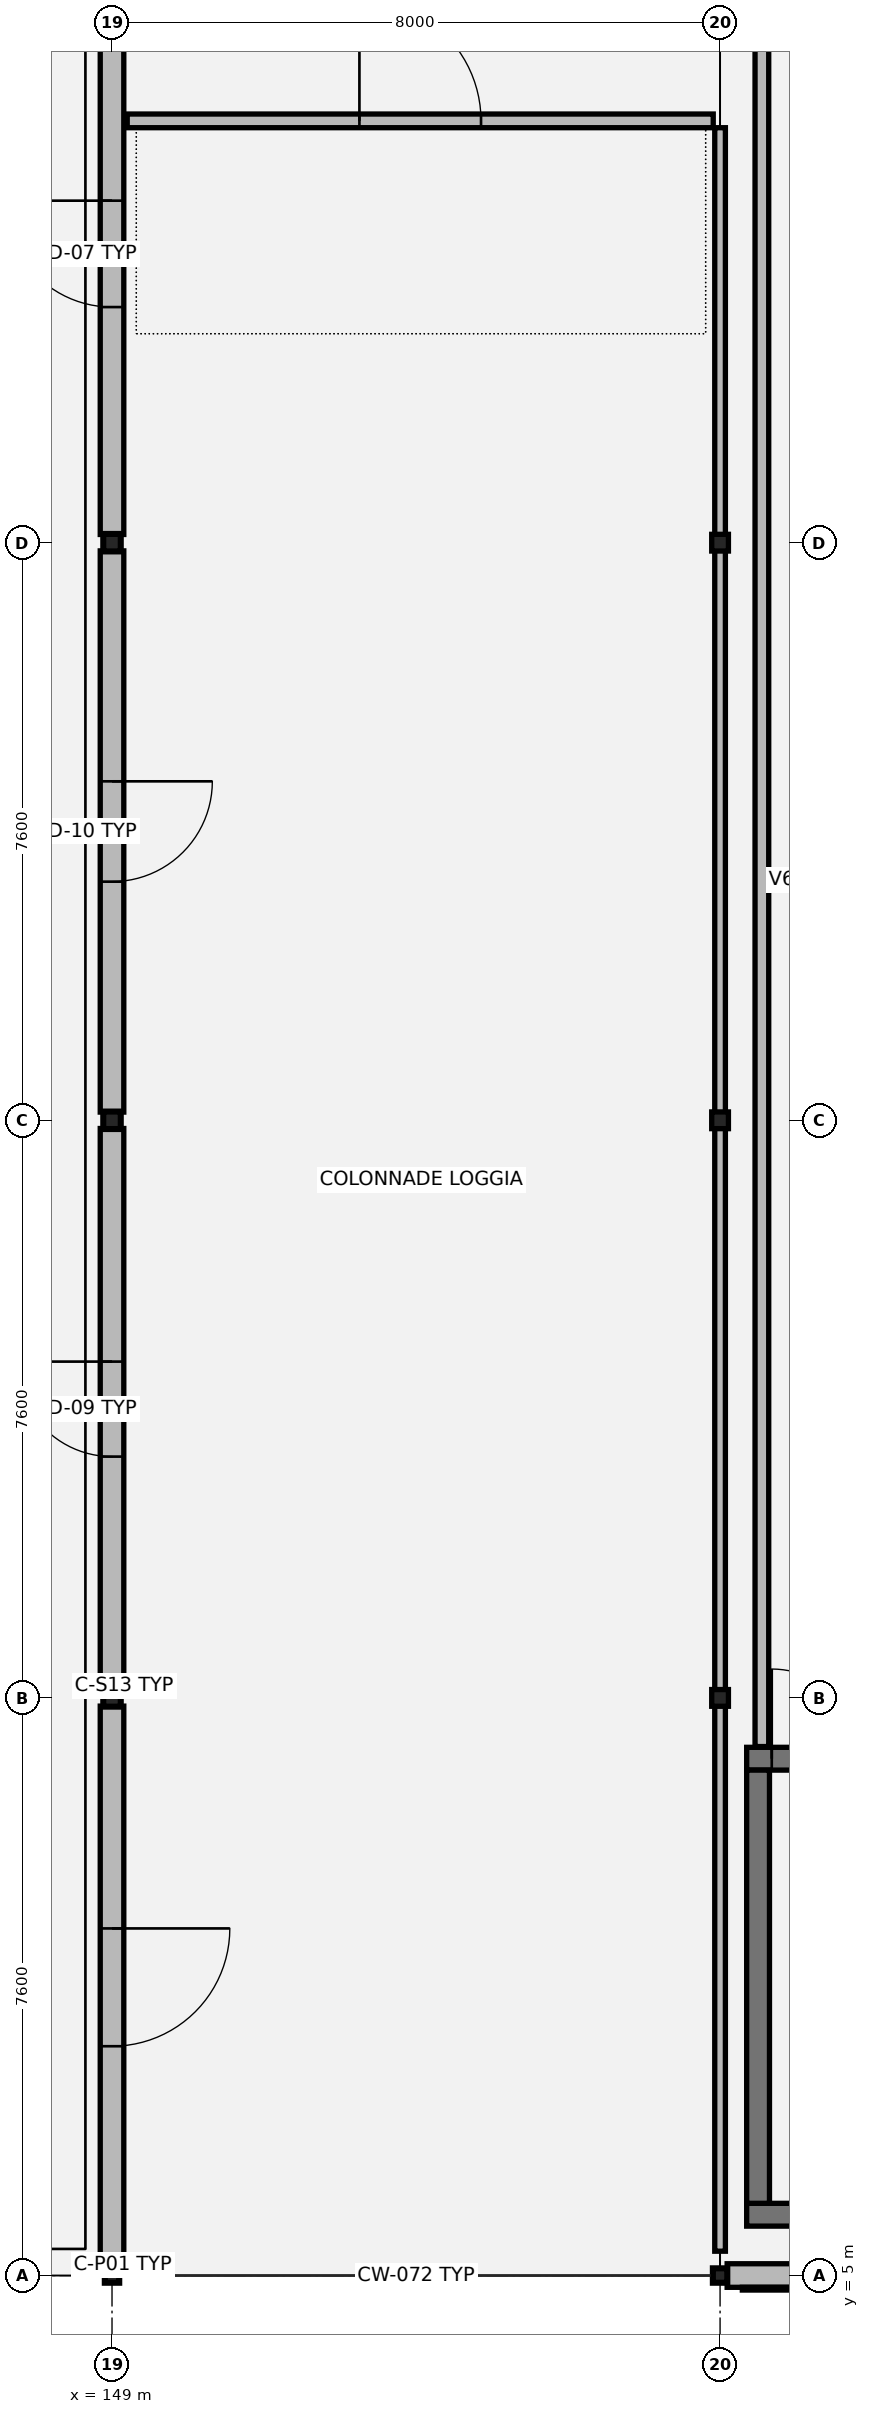
"""IFC4 building model, lengths in metres.
Left out: names, types, materials, properties, quantities, classifications, styles, units other than length and angle.
Written with IfcOpenShell. Run it as: python <this file> out.ifc"""

import sys

from ifc_helpers import new_model, si_unit, direction, frame, frame_2d, origin, origin_2d, place, context, subcontext, project, spatial, rectangle, hollow_rectangle, i_section, extrude, element, fill, save


model = new_model("IFC4")
c1 = context("Model", 3, precision=1e-05, world=origin(), true_north=direction((0.0, 1.0)))
c2 = subcontext(c1, "Body", "Model", "MODEL_VIEW")
j1 = project(units=[si_unit("LENGTHUNIT", "METRE"), si_unit("PLANEANGLEUNIT", "RADIAN")], contexts=[c1])
p1 = place(None, origin())
s1 = spatial("IfcSite", under=j1, at=p1, CompositionType="ELEMENT")
p2 = place(p1, origin())
s2 = spatial("IfcBuilding", under=s1, at=p2, CompositionType="ELEMENT")
p3 = place(p2, frame((0.0, 0.0, 17.34)))
s3 = spatial("IfcBuildingStorey", under=s2, at=p3, CompositionType="ELEMENT", Elevation=17.34)
p4 = place(p3, frame((149.0, 5.0, 0.0), z_axis=(0.0, 0.0, 1.0), x_axis=(1.0, 0.0, 0.0)))
e1 = element("IfcColumn", 1, at=p4, inside=s3, PredefinedType="COLUMN", context=c2, shape_type="SweptSolid", body=[
    extrude(hollow_rectangle(XDim=0.18, YDim=0.18, WallThickness=0.01, at=origin_2d()), origin(), (0.0, 0.0, 1.0), 3.89),
])
for number, where, z_axis, x_axis in (
    (2, (149.0, 12.6, 0.0), (0.0, 0.0, 1.0), (1.0, 0.0, 0.0)),
    (3, (149.0, 20.2, 0.0), (0.0, 0.0, 1.0), (1.0, 0.0, 0.0)),
    (4, (149.0, 27.8, 0.0), (0.0, 0.0, 1.0), (1.0, 0.0, 0.0)),
):
    element("IfcColumn", number, at=place(p3, frame(where, z_axis=z_axis, x_axis=x_axis)), inside=s3, PredefinedType="COLUMN", context=c2, shape_type="SweptSolid", body=[
        extrude(i_section(OverallWidth=0.22, OverallDepth=0.22, WebThickness=0.01, FlangeThickness=0.016, at=origin_2d()), origin(), (0.0, 0.0, 1.0), 3.89),
    ])
p5 = place(p3, frame((157.0, 5.0, 0.0), z_axis=(0.0, 0.0, 1.0), x_axis=(1.0, 0.0, 0.0)))
e5 = element("IfcColumn", 5, at=p5, inside=s3, PredefinedType="COLUMN", context=c2, shape_type="SweptSolid", body=[
    extrude(hollow_rectangle(XDim=0.18, YDim=0.18, WallThickness=0.01, at=origin_2d()), origin(), (0.0, 0.0, 1.0), 3.89),
])
for number, where, z_axis, x_axis in (
    (6, (157.0, 12.6, 0.0), (0.0, 0.0, 1.0), (1.0, 0.0, 0.0)),
    (7, (157.0, 20.2, 0.0), (0.0, 0.0, 1.0), (1.0, 0.0, 0.0)),
    (8, (157.0, 27.8, 0.0), (0.0, 0.0, 1.0), (1.0, 0.0, 0.0)),
):
    element("IfcColumn", number, at=place(p3, frame(where, z_axis=z_axis, x_axis=x_axis)), inside=s3, PredefinedType="COLUMN", context=c2, shape_type="SweptSolid", body=[
        extrude(i_section(OverallWidth=0.22, OverallDepth=0.22, WebThickness=0.01, FlangeThickness=0.016, at=origin_2d()), origin(), (0.0, 0.0, 1.0), 3.89),
    ])
p6 = place(p3, frame((157.093, 5.0, 0.0), z_axis=(0.0, 0.0, 1.0), x_axis=(1.0, 0.0, 0.0)))
e9 = element("IfcWall", 9, at=p6, inside=s3, PredefinedType="SOLIDWALL", context=c2, shape_type="SweptSolid", body=[
    extrude(rectangle(XDim=7.814, YDim=0.31, at=frame_2d((3.907, 0.0))), origin(), (0.0, 0.0, 1.0), 3.48),
])
p7 = place(p6, frame((1.882, 0.0, 0.8)))
e10 = element("IfcOpeningElement", 10, at=p7, cuts=e9, PredefinedType="OPENING", context=c2, shape_type="SweptSolid", body=[
    extrude(rectangle(XDim=1.7, YDim=2.2, at=frame_2d((0.85, 1.1))), frame((0.0, 0.165, 0.0), z_axis=(0.0, -1.0, 0.0), x_axis=(1.0, 0.0, 0.0)), (0.0, 0.0, 1.0), 0.33),
])
p8 = place(p6, frame((4.232, 0.0, 0.8)))
e11 = element("IfcOpeningElement", 11, at=p8, cuts=e9, PredefinedType="OPENING", context=c2, shape_type="SweptSolid", body=[
    extrude(rectangle(XDim=1.7, YDim=2.2, at=frame_2d((0.85, 1.1))), frame((0.0, 0.165, 0.0), z_axis=(0.0, -1.0, 0.0), x_axis=(1.0, 0.0, 0.0)), (0.0, 0.0, 1.0), 0.33),
])
p9 = place(p3, frame((149.0, 35.292, 0.0), z_axis=(0.0, 0.0, 1.0), x_axis=(0.0, -1.0, 0.0)))
e12 = element("IfcWall", 12, at=p9, inside=s3, PredefinedType="SOLIDWALL", context=c2, shape_type="SweptSolid", body=[
    extrude(rectangle(XDim=7.384, YDim=0.31, at=frame_2d((3.692, 0.0))), origin(), (0.0, 0.0, 1.0), 3.27),
])
p10 = place(p9, frame((2.992, 0.0, 0.0)))
e13 = element("IfcOpeningElement", 13, at=p10, cuts=e12, PredefinedType="OPENING", context=c2, shape_type="SweptSolid", body=[
    extrude(rectangle(XDim=1.4, YDim=2.25, at=frame_2d((0.7, 1.125))), frame((0.0, 0.165, 0.0), z_axis=(0.0, -1.0, 0.0), x_axis=(1.0, 0.0, 0.0)), (0.0, 0.0, 1.0), 0.33),
])
p11 = place(p3, frame((149.0, 27.692, 0.0), z_axis=(0.0, 0.0, 1.0), x_axis=(0.0, -1.0, 0.0)))
e14 = element("IfcWall", 14, at=p11, inside=s3, PredefinedType="SOLIDWALL", context=c2, shape_type="SweptSolid", body=[
    extrude(rectangle(XDim=7.384, YDim=0.31, at=frame_2d((3.692, 0.0))), origin(), (0.0, 0.0, 1.0), 3.27),
])
p12 = place(p11, frame((3.032, 0.0, 0.0)))
e15 = element("IfcOpeningElement", 15, at=p12, cuts=e14, PredefinedType="OPENING", context=c2, shape_type="SweptSolid", body=[
    extrude(rectangle(XDim=1.32, YDim=2.22, at=frame_2d((0.66, 1.11))), frame((0.0, 0.165, 0.0), z_axis=(0.0, -1.0, 0.0), x_axis=(1.0, 0.0, 0.0)), (0.0, 0.0, 1.0), 0.33),
])
p13 = place(p3, frame((149.0, 20.092, 0.0), z_axis=(0.0, 0.0, 1.0), x_axis=(0.0, -1.0, 0.0)))
e16 = element("IfcWall", 16, at=p13, inside=s3, PredefinedType="SOLIDWALL", context=c2, shape_type="SweptSolid", body=[
    extrude(rectangle(XDim=7.384, YDim=0.31, at=frame_2d((3.692, 0.0))), origin(), (0.0, 0.0, 1.0), 3.27),
])
p14 = place(p13, frame((3.067, 0.0, 0.0)))
e17 = element("IfcOpeningElement", 17, at=p14, cuts=e16, PredefinedType="OPENING", context=c2, shape_type="SweptSolid", body=[
    extrude(rectangle(XDim=1.25, YDim=2.2, at=frame_2d((0.625, 1.1))), frame((0.0, 0.165, 0.0), z_axis=(0.0, -1.0, 0.0), x_axis=(1.0, 0.0, 0.0)), (0.0, 0.0, 1.0), 0.33),
])
p15 = place(p3, frame((149.0, 12.492, 0.0), z_axis=(0.0, 0.0, 1.0), x_axis=(0.0, -1.0, 0.0)))
e18 = element("IfcWall", 18, at=p15, inside=s3, PredefinedType="SOLIDWALL", context=c2, shape_type="SweptSolid", body=[
    extrude(rectangle(XDim=7.399, YDim=0.31, at=frame_2d((3.699, 0.0))), origin(), (0.0, 0.0, 1.0), 3.27),
])
p16 = place(p15, frame((2.925, 0.0, 0.0)))
e19 = element("IfcOpeningElement", 19, at=p16, cuts=e18, PredefinedType="OPENING", context=c2, shape_type="SweptSolid", body=[
    extrude(rectangle(XDim=1.55, YDim=2.28, at=frame_2d((0.775, 1.14))), frame((0.0, 0.165, 0.0), z_axis=(0.0, -1.0, 0.0), x_axis=(1.0, 0.0, 0.0)), (0.0, 0.0, 1.0), 0.33),
])
p17 = place(p3, frame((157.35, 5.8, 0.0), z_axis=(0.0, 0.0, 1.0), x_axis=(1.0, 0.0, 0.0)))
e20 = element("IfcWall", 20, at=p17, inside=s3, PredefinedType="SHEAR", context=c2, shape_type="SweptSolid", body=[
    extrude(rectangle(XDim=7.3, YDim=0.3, at=frame_2d((3.65, 0.0))), origin(), (0.0, 0.0, 1.0), 3.845),
])
p18 = place(p3, frame((157.35, 11.8, 0.0), z_axis=(0.0, 0.0, 1.0), x_axis=(1.0, 0.0, 0.0)))
e21 = element("IfcWall", 21, at=p18, inside=s3, PredefinedType="SHEAR", context=c2, shape_type="SweptSolid", body=[
    extrude(rectangle(XDim=7.3, YDim=0.3, at=frame_2d((3.65, 0.0))), origin(), (0.0, 0.0, 1.0), 3.845),
])
p19 = place(p18, frame((0.33, 0.0, 0.0)))
e22 = element("IfcOpeningElement", 22, at=p19, cuts=e21, PredefinedType="OPENING", context=c2, shape_type="SweptSolid", body=[
    extrude(rectangle(XDim=1.18, YDim=2.18, at=frame_2d((0.59, 1.09))), frame((0.0, 0.16, 0.0), z_axis=(0.0, -1.0, 0.0), x_axis=(1.0, 0.0, 0.0)), (0.0, 0.0, 1.0), 0.32),
])
p20 = place(p3, frame((157.5, 5.95, 0.0), z_axis=(0.0, 0.0, 1.0), x_axis=(0.0, 1.0, 0.0)))
e23 = element("IfcWall", 23, at=p20, inside=s3, PredefinedType="SHEAR", context=c2, shape_type="SweptSolid", body=[
    extrude(rectangle(XDim=5.7, YDim=0.3, at=frame_2d((2.85, 0.0))), origin(), (0.0, 0.0, 1.0), 3.845),
])
p21 = place(p3, frame((149.2, 33.35, 0.0), z_axis=(0.0, 0.0, 1.0), x_axis=(1.0, 0.0, 0.0)))
e24 = element("IfcWall", 24, at=p21, inside=s3, PredefinedType="PARTITIONING", context=c2, shape_type="SweptSolid", body=[
    extrude(rectangle(XDim=7.71, YDim=0.18, at=frame_2d((3.855, 0.0))), origin(), (0.0, 0.0, 1.0), 3.18),
])
p22 = place(p21, frame((3.055, 0.0, 0.0)))
e25 = element("IfcOpeningElement", 25, at=p22, cuts=e24, PredefinedType="OPENING", context=c2, shape_type="SweptSolid", body=[
    extrude(rectangle(XDim=1.6, YDim=2.25, at=frame_2d((0.8, 1.125))), frame((0.0, 0.1, 0.0), z_axis=(0.0, -1.0, 0.0), x_axis=(1.0, 0.0, 0.0)), (0.0, 0.0, 1.0), 0.2),
])
p23 = place(p3, frame((157.55, 11.96, 0.0), z_axis=(0.0, 0.0, 1.0), x_axis=(0.0, 1.0, 0.0)))
e26 = element("IfcWall", 26, at=p23, inside=s3, PredefinedType="PARTITIONING", context=c2, shape_type="SweptSolid", body=[
    extrude(rectangle(XDim=24.08, YDim=0.18, at=frame_2d((12.04, 0.0))), origin(), (0.0, 0.0, 1.0), 3.18),
])
p24 = place(p3, frame((157.0, 5.32, 0.0), z_axis=(0.0, 0.0, 1.0), x_axis=(0.0, 1.0, 0.0)))
e27 = element("IfcWall", 27, at=p24, inside=s3, PredefinedType="PARTITIONING", context=c2, shape_type="SweptSolid", body=[
    extrude(rectangle(XDim=27.94, YDim=0.14, at=frame_2d((13.97, 0.0))), origin(), (0.0, 0.0, 1.0), 3.18),
])
p25 = place(p10, origin())
e28 = element("IfcDoor", 28, at=p25, inside=s3, OperationType="SINGLE_SWING_RIGHT", PredefinedType="DOOR", context=c2, shape_type="SweptSolid", body=[
    extrude(rectangle(XDim=1.4, YDim=2.25, at=frame_2d((0.7, 1.125))), frame((0.0, 0.025, 0.0), z_axis=(0.0, -1.0, 0.0), x_axis=(1.0, 0.0, 0.0)), (0.0, 0.0, 1.0), 0.05),
])
fill(e13, e28)
p26 = place(p12, origin())
e29 = element("IfcDoor", 29, at=p26, inside=s3, OperationType="SINGLE_SWING_LEFT", PredefinedType="DOOR", context=c2, shape_type="SweptSolid", body=[
    extrude(rectangle(XDim=1.32, YDim=2.22, at=frame_2d((0.66, 1.11))), frame((0.0, 0.025, 0.0), z_axis=(0.0, -1.0, 0.0), x_axis=(1.0, 0.0, 0.0)), (0.0, 0.0, 1.0), 0.05),
])
fill(e15, e29)
p27 = place(p14, origin())
e30 = element("IfcDoor", 30, at=p27, inside=s3, OperationType="SINGLE_SWING_RIGHT", PredefinedType="DOOR", context=c2, shape_type="SweptSolid", body=[
    extrude(rectangle(XDim=1.25, YDim=2.2, at=frame_2d((0.625, 1.1))), frame((0.0, 0.025, 0.0), z_axis=(0.0, -1.0, 0.0), x_axis=(1.0, 0.0, 0.0)), (0.0, 0.0, 1.0), 0.05),
])
fill(e17, e30)
p28 = place(p16, origin())
e31 = element("IfcDoor", 31, at=p28, inside=s3, OperationType="SINGLE_SWING_LEFT", PredefinedType="DOOR", context=c2, shape_type="SweptSolid", body=[
    extrude(rectangle(XDim=1.55, YDim=2.28, at=frame_2d((0.775, 1.14))), frame((0.0, 0.025, 0.0), z_axis=(0.0, -1.0, 0.0), x_axis=(1.0, 0.0, 0.0)), (0.0, 0.0, 1.0), 0.05),
])
fill(e19, e31)
p29 = place(p19, origin())
e32 = element("IfcDoor", 32, at=p29, inside=s3, OperationType="SINGLE_SWING_LEFT", PredefinedType="DOOR", context=c2, shape_type="SweptSolid", body=[
    extrude(rectangle(XDim=1.18, YDim=2.18, at=frame_2d((0.59, 1.09))), frame((0.0, 0.025, 0.0), z_axis=(0.0, -1.0, 0.0), x_axis=(1.0, 0.0, 0.0)), (0.0, 0.0, 1.0), 0.05),
])
fill(e22, e32)
p30 = place(p22, origin())
e33 = element("IfcDoor", 33, at=p30, inside=s3, OperationType="DOUBLE_DOOR_SINGLE_SWING", PredefinedType="DOOR", context=c2, shape_type="SweptSolid", body=[
    extrude(rectangle(XDim=1.6, YDim=2.25, at=frame_2d((0.8, 1.125))), frame((0.0, 0.025, 0.0), z_axis=(0.0, -1.0, 0.0), x_axis=(1.0, 0.0, 0.0)), (0.0, 0.0, 1.0), 0.05),
])
fill(e25, e33)
save(model, sys.argv[1])
